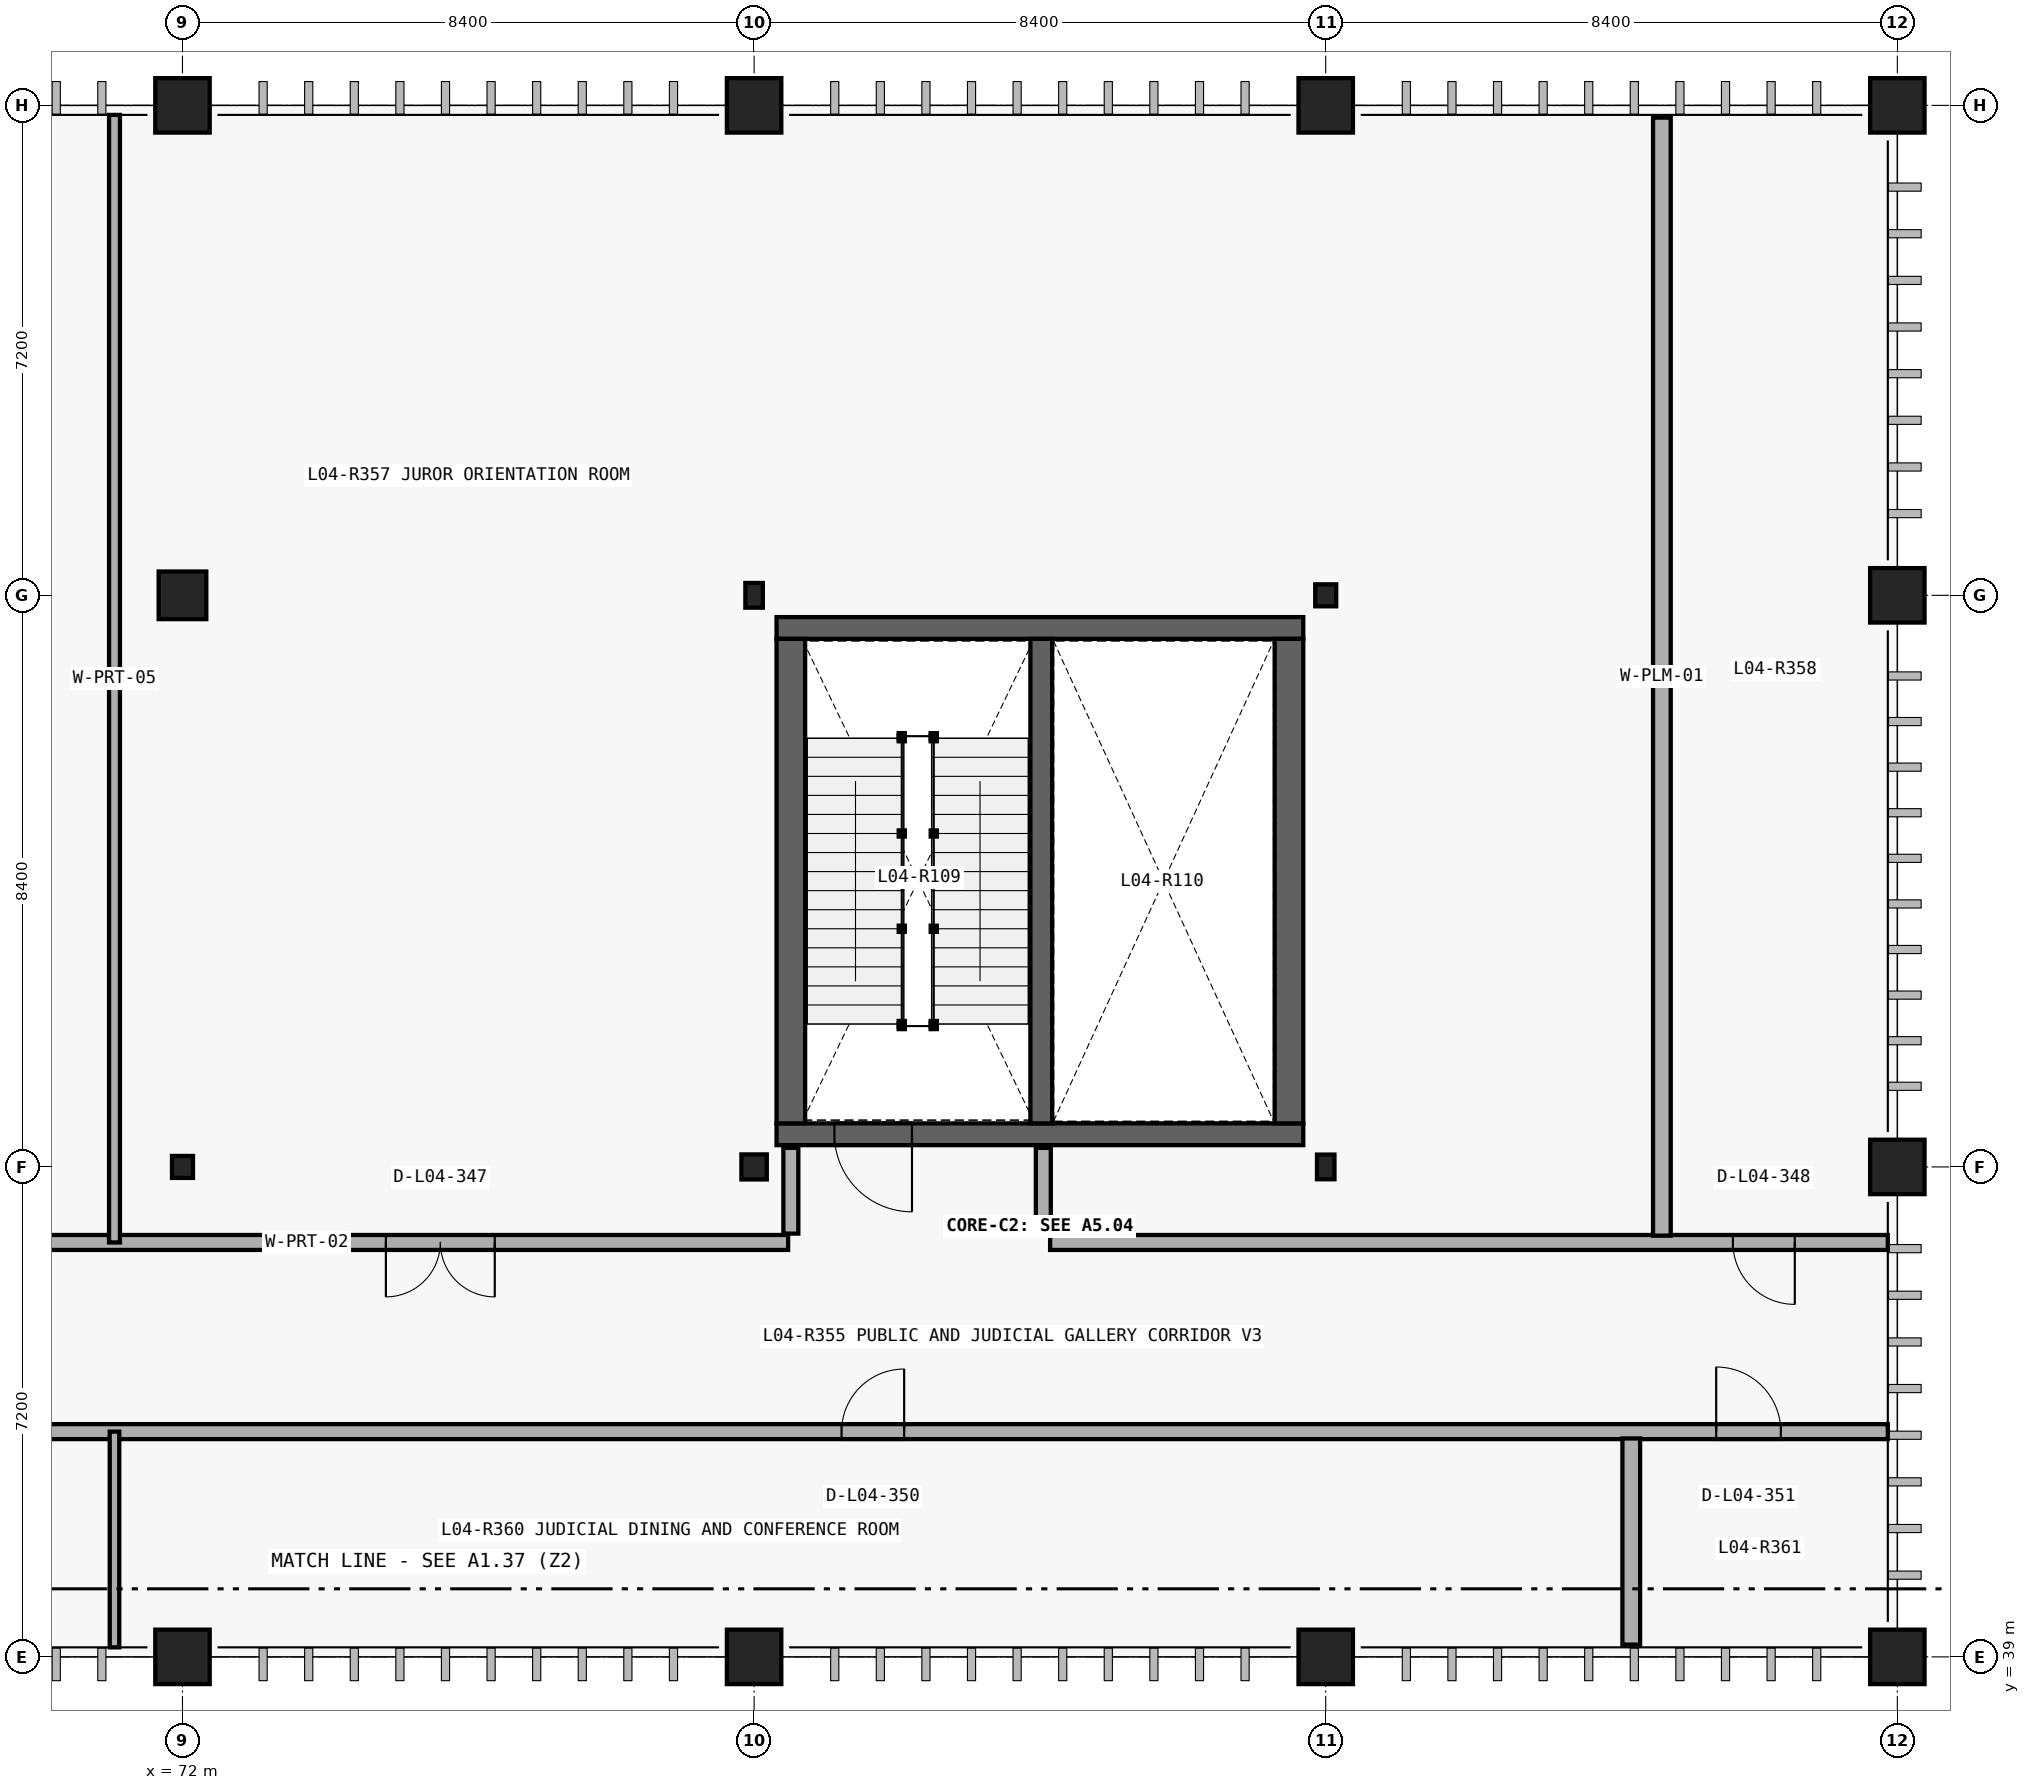
"""IFC4 building model, lengths in metres.
Left out: names, types, materials, properties, quantities, classifications, styles, units other than length and angle.
Written with IfcOpenShell. Run it as: python <this file> out.ifc"""

import sys

from ifc_helpers import new_model, si_unit, direction, frame, frame_2d, origin_with_axes, origin_2d_with_axis, place, context, subcontext, project, spatial, rectangle, circle, i_section, extrude, element, fill, save


model = new_model("IFC4")
c1 = context("Model", 3, precision=1e-05, world=origin_with_axes(), true_north=direction((0.0, 1.0)))
c2 = subcontext(c1, "Body", "Model", "MODEL_VIEW")
j1 = project(units=[si_unit("LENGTHUNIT", "METRE"), si_unit("PLANEANGLEUNIT", "RADIAN")], contexts=[c1])
p1 = place(None, origin_with_axes())
s1 = spatial("IfcSite", under=j1, at=p1, CompositionType="ELEMENT")
p2 = place(p1, origin_with_axes())
s2 = spatial("IfcBuilding", under=s1, at=p2, CompositionType="ELEMENT")
p3 = place(p2, frame((0.0, 0.0, 20.4), z_axis=(0.0, 0.0, 1.0), x_axis=(1.0, 0.0, 0.0)))
s3 = spatial("IfcBuildingStorey", under=s2, at=p3, CompositionType="ELEMENT", Elevation=20.4)
p4 = place(None, frame((80.73, 46.68, 20.4), z_axis=(0.0, 0.0, 1.0), x_axis=(1.0, 0.0, 0.0)))
e1 = element("IfcWall", 1, at=p4, inside=s3, PredefinedType="SHEAR", context=c2, shape_type="SweptSolid", body=[
    extrude(rectangle(XDim=7.74, YDim=0.32, at=frame_2d((3.87, 0.0), x_axis=(1.0, 0.0))), origin_with_axes(), (0.0, 0.0, 1.0), 4.5),
])
p5 = place(None, frame((82.15, 46.68, 20.4), z_axis=(0.0, 0.0, 1.0), x_axis=(1.0, 0.0, 0.0)))
e2 = element("IfcOpeningElement", 2, at=p5, cuts=e1, PredefinedType="OPENING", context=c2, shape_type="SweptSolid", body=[
    extrude(rectangle(XDim=1.14, YDim=2.18, at=frame_2d((0.0, 1.09), x_axis=(1.0, 0.0))), frame((0.0, 0.17, 0.0), z_axis=(0.0, -1.0, 0.0), x_axis=(1.0, 0.0, 0.0)), (0.0, 0.0, 1.0), 0.34),
])
p6 = place(None, frame((88.47, 54.12, 20.4), z_axis=(0.0, 0.0, 1.0), x_axis=(-1.0, 0.0, 0.0)))
e3 = element("IfcWall", 3, at=p6, inside=s3, PredefinedType="SHEAR", context=c2, shape_type="SweptSolid", body=[
    extrude(rectangle(XDim=7.74, YDim=0.32, at=frame_2d((3.87, 0.0), x_axis=(1.0, 0.0))), origin_with_axes(), (0.0, 0.0, 1.0), 4.5),
])
for number, where, z_axis, x_axis in (
    (4, (88.26, 46.84, 20.4), (0.0, 0.0, 1.0), (0.0, 1.0, 0.0)),
    (5, (80.94, 53.96, 20.4), (0.0, 0.0, 1.0), (0.0, -1.0, 0.0)),
):
    element("IfcWall", number, at=place(None, frame(where, z_axis=z_axis, x_axis=x_axis)), inside=s3, PredefinedType="SHEAR", context=c2, shape_type="SweptSolid", body=[
        extrude(rectangle(XDim=7.12, YDim=0.42, at=frame_2d((3.56, 0.0), x_axis=(1.0, 0.0))), origin_with_axes(), (0.0, 0.0, 1.0), 4.5),
    ])
p7 = place(None, frame((84.62, 46.84, 20.4), z_axis=(0.0, 0.0, 1.0), x_axis=(0.0, 1.0, 0.0)))
e6 = element("IfcWall", 6, at=p7, inside=s3, PredefinedType="SHEAR", context=c2, shape_type="SweptSolid", body=[
    extrude(rectangle(XDim=7.12, YDim=0.32, at=frame_2d((3.56, 0.0), x_axis=(1.0, 0.0))), origin_with_axes(), (0.0, 0.0, 1.0), 4.5),
])
for number, where, z_axis, x_axis in (
    (7, (80.94, 45.22, 20.4), (0.0, 0.0, 1.0), (0.0, 1.0, 0.0)),
    (8, (84.65, 45.22, 20.4), (0.0, 0.0, 1.0), (0.0, 1.0, 0.0)),
):
    element("IfcWall", number, at=place(None, frame(where, z_axis=z_axis, x_axis=x_axis)), inside=s3, PredefinedType="PARTITIONING", context=c2, shape_type="SweptSolid", body=[
        extrude(rectangle(XDim=1.26, YDim=0.22, at=frame_2d((0.63, 0.0), x_axis=(1.0, 0.0))), origin_with_axes(), (0.0, 0.0, 1.0), 4.18),
    ])
p8 = place(None, frame((66.755, 45.09, 20.4), z_axis=(0.0, 0.0, 1.0), x_axis=(1.0, 0.0, 0.0)))
e9 = element("IfcWall", 9, at=p8, inside=s3, PredefinedType="PARTITIONING", context=c2, shape_type="SweptSolid", body=[
    extrude(rectangle(XDim=14.145, YDim=0.22, at=frame_2d((7.072, 0.0), x_axis=(1.0, 0.0))), origin_with_axes(), (0.0, 0.0, 1.0), 4.18),
])
p9 = place(None, frame((75.789, 45.09, 20.4), z_axis=(0.0, 0.0, 1.0), x_axis=(1.0, 0.0, 0.0)))
e10 = element("IfcOpeningElement", 10, at=p9, cuts=e9, PredefinedType="OPENING", context=c2, shape_type="SweptSolid", body=[
    extrude(rectangle(XDim=1.6, YDim=2.32, at=frame_2d((0.0, 1.16), x_axis=(1.0, 0.0))), frame((0.0, 0.12, 0.0), z_axis=(0.0, -1.0, 0.0), x_axis=(1.0, 0.0, 0.0)), (0.0, 0.0, 1.0), 0.24),
])
p10 = place(None, frame((84.75, 45.09, 20.4), z_axis=(0.0, 0.0, 1.0), x_axis=(1.0, 0.0, 0.0)))
e11 = element("IfcWall", 11, at=p10, inside=s3, PredefinedType="PARTITIONING", context=c2, shape_type="SweptSolid", body=[
    extrude(rectangle(XDim=12.31, YDim=0.22, at=frame_2d((6.155, 0.0), x_axis=(1.0, 0.0))), origin_with_axes(), (0.0, 0.0, 1.0), 4.18),
])
p11 = place(None, frame((95.238, 45.09, 20.4), z_axis=(0.0, 0.0, 1.0), x_axis=(1.0, 0.0, 0.0)))
e12 = element("IfcOpeningElement", 12, at=p11, cuts=e11, PredefinedType="OPENING", context=c2, shape_type="SweptSolid", body=[
    extrude(rectangle(XDim=0.91, YDim=2.12, at=frame_2d((0.0, 1.06), x_axis=(1.0, 0.0))), frame((0.0, 0.12, 0.0), z_axis=(0.0, -1.0, 0.0), x_axis=(1.0, 0.0, 0.0)), (0.0, 0.0, 1.0), 0.24),
])
p12 = place(None, frame((46.94, 42.31, 20.4), z_axis=(0.0, 0.0, 1.0), x_axis=(1.0, 0.0, 0.0)))
e13 = element("IfcWall", 13, at=p12, inside=s3, PredefinedType="PARTITIONING", context=c2, shape_type="SweptSolid", body=[
    extrude(rectangle(XDim=50.12, YDim=0.22, at=frame_2d((25.06, 0.0), x_axis=(1.0, 0.0))), origin_with_axes(), (0.0, 0.0, 1.0), 4.18),
])
p13 = place(None, frame((59.132, 42.31, 20.4), z_axis=(0.0, 0.0, 1.0), x_axis=(1.0, 0.0, 0.0)))
e14 = element("IfcOpeningElement", 14, at=p13, cuts=e13, PredefinedType="OPENING", context=c2, shape_type="SweptSolid", body=[
    extrude(rectangle(XDim=0.96, YDim=2.2, at=frame_2d((0.0, 1.1), x_axis=(1.0, 0.0))), frame((0.0, 0.12, 0.0), z_axis=(0.0, -1.0, 0.0), x_axis=(1.0, 0.0, 0.0)), (0.0, 0.0, 1.0), 0.24),
])
p14 = place(None, frame((82.145, 42.31, 20.4), z_axis=(0.0, 0.0, 1.0), x_axis=(1.0, 0.0, 0.0)))
e15 = element("IfcOpeningElement", 15, at=p14, cuts=e13, PredefinedType="OPENING", context=c2, shape_type="SweptSolid", body=[
    extrude(rectangle(XDim=0.92, YDim=2.14, at=frame_2d((0.0, 1.07), x_axis=(1.0, 0.0))), frame((0.0, 0.12, 0.0), z_axis=(0.0, -1.0, 0.0), x_axis=(1.0, 0.0, 0.0)), (0.0, 0.0, 1.0), 0.24),
])
p15 = place(None, frame((95.013, 42.31, 20.4), z_axis=(0.0, 0.0, 1.0), x_axis=(1.0, 0.0, 0.0)))
e16 = element("IfcOpeningElement", 16, at=p15, cuts=e13, PredefinedType="OPENING", context=c2, shape_type="SweptSolid", body=[
    extrude(rectangle(XDim=0.95, YDim=2.1, at=frame_2d((0.0, 1.05), x_axis=(1.0, 0.0))), frame((0.0, 0.12, 0.0), z_axis=(0.0, -1.0, 0.0), x_axis=(1.0, 0.0, 0.0)), (0.0, 0.0, 1.0), 0.24),
])
p16 = place(None, frame((93.74, 45.19, 20.4), z_axis=(0.0, 0.0, 1.0), x_axis=(0.0, 1.0, 0.0)))
e17 = element("IfcWall", 17, at=p16, inside=s3, PredefinedType="PLUMBINGWALL", context=c2, shape_type="SweptSolid", body=[
    extrude(rectangle(XDim=16.43, YDim=0.26, at=frame_2d((8.215, 0.0), x_axis=(1.0, 0.0))), origin_with_axes(), (0.0, 0.0, 1.0), 4.18),
])
p17 = place(None, frame((93.29, 39.18, 20.4), z_axis=(0.0, 0.0, 1.0), x_axis=(0.0, 1.0, 0.0)))
e18 = element("IfcWall", 18, at=p17, inside=s3, PredefinedType="PLUMBINGWALL", context=c2, shape_type="SweptSolid", body=[
    extrude(rectangle(XDim=3.03, YDim=0.26, at=frame_2d((1.515, 0.0), x_axis=(1.0, 0.0))), origin_with_axes(), (0.0, 0.0, 1.0), 4.18),
])
p18 = place(None, frame((71.001, 45.09, 20.4), z_axis=(0.0, 0.0, 1.0), x_axis=(0.0, 1.0, 0.0)))
e19 = element("IfcWall", 19, at=p18, inside=s3, PredefinedType="PARTITIONING", context=c2, shape_type="SweptSolid", body=[
    extrude(rectangle(XDim=16.57, YDim=0.16, at=frame_2d((8.285, 0.0), x_axis=(1.0, 0.0))), origin_with_axes(), (0.0, 0.0, 1.0), 4.18),
])
p19 = place(None, frame((71.001, 39.14, 20.4), z_axis=(0.0, 0.0, 1.0), x_axis=(0.0, 1.0, 0.0)))
e20 = element("IfcWall", 20, at=p19, inside=s3, PredefinedType="PARTITIONING", context=c2, shape_type="SweptSolid", body=[
    extrude(rectangle(XDim=3.17, YDim=0.14, at=frame_2d((1.585, 0.0), x_axis=(1.0, 0.0))), origin_with_axes(), (0.0, 0.0, 1.0), 4.18),
])
p20 = place(None, frame((72.0, 39.0, 20.4), z_axis=(0.0, 0.0, 1.0), x_axis=(1.0, 0.0, 0.0)))
e21 = element("IfcColumn", 21, at=p20, inside=s3, PredefinedType="COLUMN", context=c2, shape_type="SweptSolid", body=[
    extrude(circle(Radius=0.4, at=origin_2d_with_axis()), origin_with_axes(), (0.0, 0.0, 1.0), 4.5),
])
p21 = place(None, frame((72.0, 46.2, 20.4), z_axis=(0.0, 0.0, 1.0), x_axis=(1.0, 0.0, 0.0)))
e22 = element("IfcColumn", 22, at=p21, inside=s3, PredefinedType="COLUMN", context=c2, shape_type="SweptSolid", body=[
    extrude(i_section(OverallWidth=0.309, OverallDepth=0.323, WebThickness=0.014, FlangeThickness=0.023, at=origin_2d_with_axis()), origin_with_axes(), (0.0, 0.0, 1.0), 4.5),
])
p22 = place(None, frame((72.0, 54.6, 20.4), z_axis=(0.0, 0.0, 1.0), x_axis=(1.0, 0.0, 0.0)))
e23 = element("IfcColumn", 23, at=p22, inside=s3, PredefinedType="COLUMN", context=c2, shape_type="SweptSolid", body=[
    extrude(rectangle(XDim=0.7, YDim=0.7, at=origin_2d_with_axis()), origin_with_axes(), (0.0, 0.0, 1.0), 4.5),
])
for number, where, z_axis, x_axis in (
    (24, (72.0, 61.8, 20.4), (0.0, 0.0, 1.0), (1.0, 0.0, 0.0)),
    (25, (80.4, 39.0, 20.4), (0.0, 0.0, 1.0), (1.0, 0.0, 0.0)),
):
    element("IfcColumn", number, at=place(None, frame(where, z_axis=z_axis, x_axis=x_axis)), inside=s3, PredefinedType="COLUMN", context=c2, shape_type="SweptSolid", body=[
        extrude(circle(Radius=0.4, at=origin_2d_with_axis()), origin_with_axes(), (0.0, 0.0, 1.0), 4.5),
    ])
p23 = place(None, frame((80.4, 46.2, 20.4), z_axis=(0.0, 0.0, 1.0), x_axis=(1.0, 0.0, 0.0)))
e26 = element("IfcColumn", 26, at=p23, inside=s3, PredefinedType="COLUMN", context=c2, shape_type="SweptSolid", body=[
    extrude(i_section(OverallWidth=0.373, OverallDepth=0.368, WebThickness=0.015, FlangeThickness=0.024, at=origin_2d_with_axis()), origin_with_axes(), (0.0, 0.0, 1.0), 4.5),
])
p24 = place(None, frame((80.4, 54.6, 20.4), z_axis=(0.0, 0.0, 1.0), x_axis=(1.0, 0.0, 0.0)))
e27 = element("IfcColumn", 27, at=p24, inside=s3, PredefinedType="COLUMN", context=c2, shape_type="SweptSolid", body=[
    extrude(i_section(OverallWidth=0.257, OverallDepth=0.363, WebThickness=0.013, FlangeThickness=0.022, at=origin_2d_with_axis()), origin_with_axes(), (0.0, 0.0, 1.0), 4.5),
])
for number, where, z_axis, x_axis in (
    (28, (80.4, 61.8, 20.4), (0.0, 0.0, 1.0), (1.0, 0.0, 0.0)),
    (29, (88.8, 39.0, 20.4), (0.0, 0.0, 1.0), (1.0, 0.0, 0.0)),
):
    element("IfcColumn", number, at=place(None, frame(where, z_axis=z_axis, x_axis=x_axis)), inside=s3, PredefinedType="COLUMN", context=c2, shape_type="SweptSolid", body=[
        extrude(circle(Radius=0.4, at=origin_2d_with_axis()), origin_with_axes(), (0.0, 0.0, 1.0), 4.5),
    ])
p25 = place(None, frame((88.8, 46.2, 20.4), z_axis=(0.0, 0.0, 1.0), x_axis=(1.0, 0.0, 0.0)))
e30 = element("IfcColumn", 30, at=p25, inside=s3, PredefinedType="COLUMN", context=c2, shape_type="SweptSolid", body=[
    extrude(i_section(OverallWidth=0.257, OverallDepth=0.363, WebThickness=0.013, FlangeThickness=0.022, at=origin_2d_with_axis()), origin_with_axes(), (0.0, 0.0, 1.0), 4.5),
])
p26 = place(None, frame((88.8, 54.6, 20.4), z_axis=(0.0, 0.0, 1.0), x_axis=(1.0, 0.0, 0.0)))
e31 = element("IfcColumn", 31, at=p26, inside=s3, PredefinedType="COLUMN", context=c2, shape_type="SweptSolid", body=[
    extrude(i_section(OverallWidth=0.309, OverallDepth=0.323, WebThickness=0.014, FlangeThickness=0.023, at=origin_2d_with_axis()), origin_with_axes(), (0.0, 0.0, 1.0), 4.5),
])
for number, where, z_axis, x_axis in (
    (32, (88.8, 61.8, 20.4), (0.0, 0.0, 1.0), (1.0, 0.0, 0.0)),
    (33, (97.2, 39.0, 20.4), (0.0, 0.0, 1.0), (1.0, 0.0, 0.0)),
    (34, (97.2, 46.2, 20.4), (0.0, 0.0, 1.0), (1.0, 0.0, 0.0)),
    (35, (97.2, 54.6, 20.4), (0.0, 0.0, 1.0), (1.0, 0.0, 0.0)),
    (36, (97.2, 61.8, 20.4), (0.0, 0.0, 1.0), (1.0, 0.0, 0.0)),
):
    element("IfcColumn", number, at=place(None, frame(where, z_axis=z_axis, x_axis=x_axis)), inside=s3, PredefinedType="COLUMN", context=c2, shape_type="SweptSolid", body=[
        extrude(circle(Radius=0.4, at=origin_2d_with_axis()), origin_with_axes(), (0.0, 0.0, 1.0), 4.5),
    ])
p27 = place(None, frame((82.15, 46.68, 20.4), z_axis=(0.0, 0.0, 1.0), x_axis=(-1.0, 0.0, 0.0)))
e37 = element("IfcDoor", 37, at=p27, inside=s3, OperationType="SINGLE_SWING_RIGHT", PredefinedType="DOOR", context=c2, shape_type="SweptSolid", body=[
    extrude(rectangle(XDim=1.14, YDim=2.18, at=frame_2d((0.0, 1.09), x_axis=(1.0, 0.0))), frame((0.0, 0.04, 0.0), z_axis=(0.0, -1.0, 0.0), x_axis=(1.0, 0.0, 0.0)), (0.0, 0.0, 1.0), 0.08),
])
fill(e2, e37)
p28 = place(None, frame((75.789, 45.09, 20.4), z_axis=(0.0, 0.0, 1.0), x_axis=(-1.0, 0.0, 0.0)))
e38 = element("IfcDoor", 38, at=p28, inside=s3, OperationType="DOUBLE_DOOR_SINGLE_SWING", PredefinedType="DOOR", context=c2, shape_type="SweptSolid", body=[
    extrude(rectangle(XDim=1.6, YDim=2.32, at=frame_2d((0.0, 1.16), x_axis=(1.0, 0.0))), frame((0.0, 0.04, 0.0), z_axis=(0.0, -1.0, 0.0), x_axis=(1.0, 0.0, 0.0)), (0.0, 0.0, 1.0), 0.08),
])
fill(e10, e38)
p29 = place(None, frame((95.238, 45.09, 20.4), z_axis=(0.0, 0.0, 1.0), x_axis=(-1.0, 0.0, 0.0)))
e39 = element("IfcDoor", 39, at=p29, inside=s3, OperationType="SINGLE_SWING_RIGHT", PredefinedType="DOOR", context=c2, shape_type="SweptSolid", body=[
    extrude(rectangle(XDim=0.91, YDim=2.12, at=frame_2d((0.0, 1.06), x_axis=(1.0, 0.0))), frame((0.0, 0.04, 0.0), z_axis=(0.0, -1.0, 0.0), x_axis=(1.0, 0.0, 0.0)), (0.0, 0.0, 1.0), 0.08),
])
fill(e12, e39)
p30 = place(None, frame((82.145, 42.31, 20.4), z_axis=(0.0, 0.0, 1.0), x_axis=(1.0, 0.0, 0.0)))
e40 = element("IfcDoor", 40, at=p30, inside=s3, OperationType="SINGLE_SWING_RIGHT", PredefinedType="DOOR", context=c2, shape_type="SweptSolid", body=[
    extrude(rectangle(XDim=0.92, YDim=2.14, at=frame_2d((0.0, 1.07), x_axis=(1.0, 0.0))), frame((0.0, 0.04, 0.0), z_axis=(0.0, -1.0, 0.0), x_axis=(1.0, 0.0, 0.0)), (0.0, 0.0, 1.0), 0.08),
])
fill(e15, e40)
p31 = place(None, frame((95.013, 42.31, 20.4), z_axis=(0.0, 0.0, 1.0), x_axis=(1.0, 0.0, 0.0)))
e41 = element("IfcDoor", 41, at=p31, inside=s3, OperationType="SINGLE_SWING_LEFT", PredefinedType="DOOR", context=c2, shape_type="SweptSolid", body=[
    extrude(rectangle(XDim=0.95, YDim=2.1, at=frame_2d((0.0, 1.05), x_axis=(1.0, 0.0))), frame((0.0, 0.04, 0.0), z_axis=(0.0, -1.0, 0.0), x_axis=(1.0, 0.0, 0.0)), (0.0, 0.0, 1.0), 0.08),
])
fill(e16, e41)
save(model, sys.argv[1])
